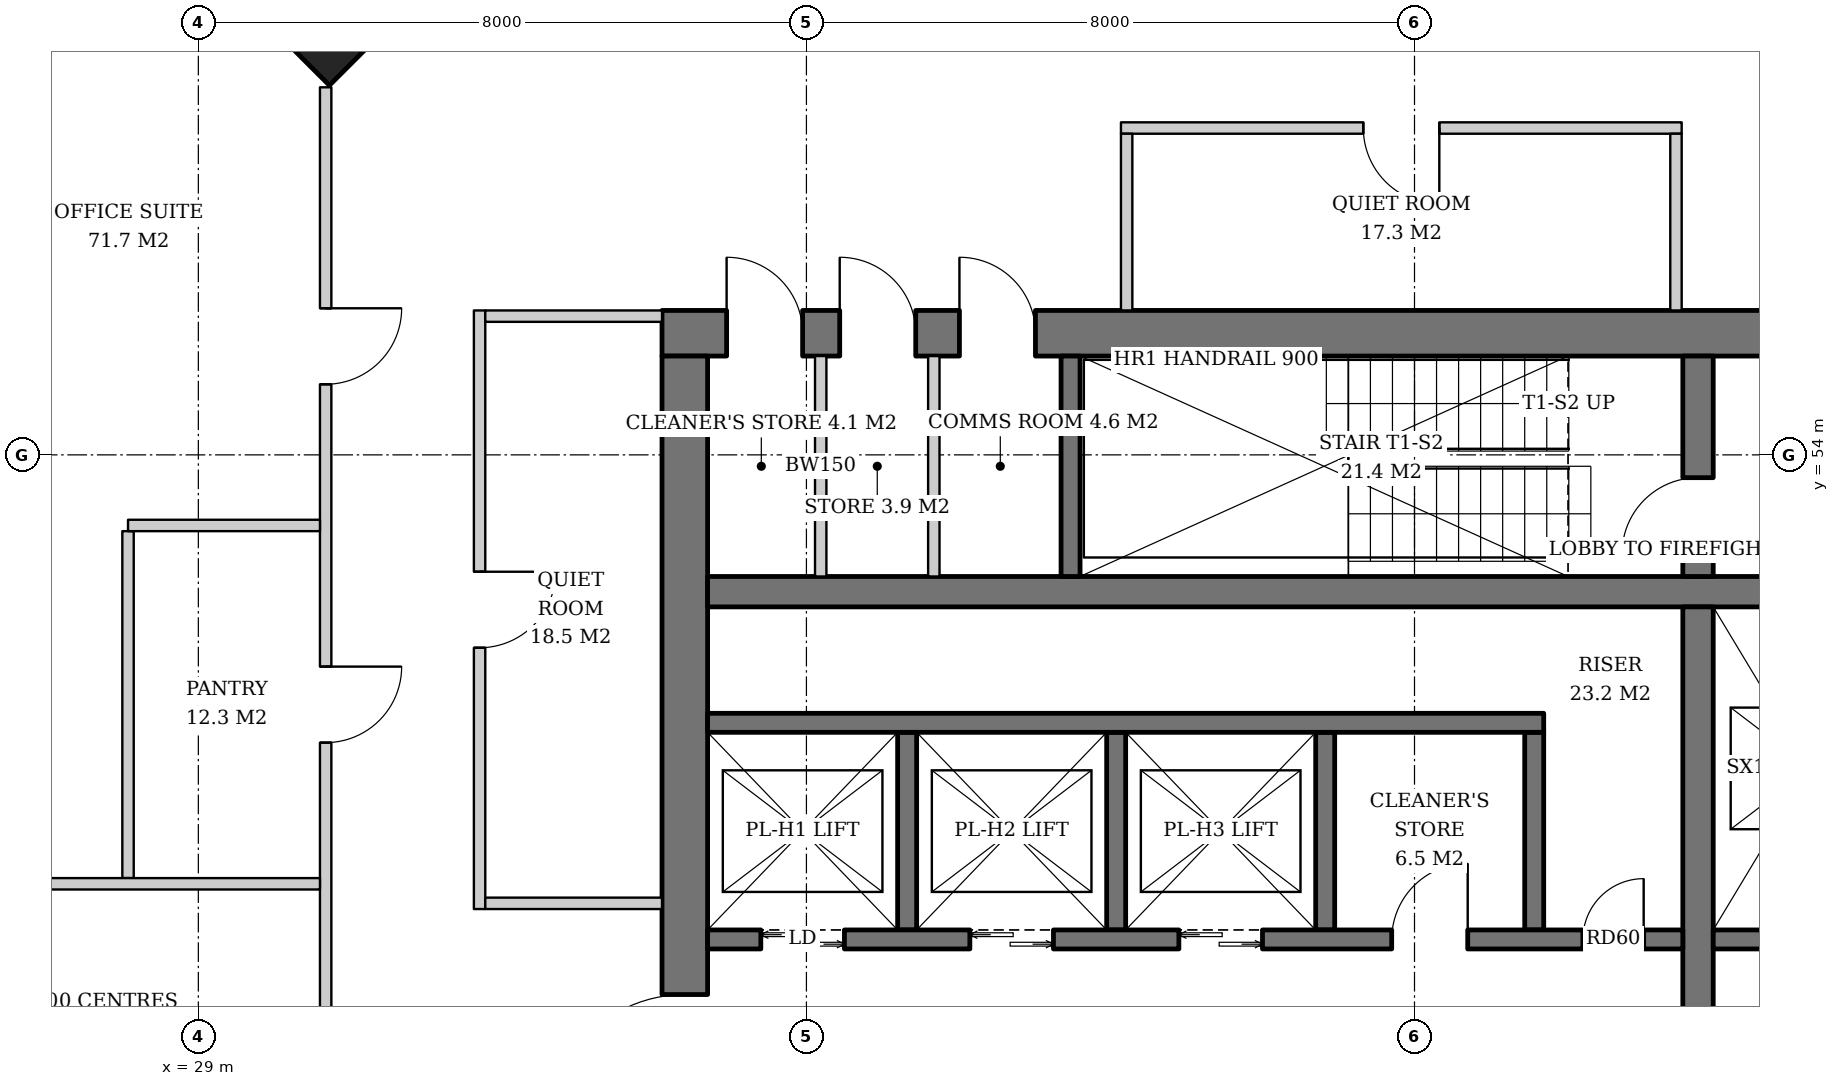
"""IFC4 building model, lengths in metres.
Left out: names, types, materials, properties, quantities, classifications, styles, units other than length and angle.
Written with IfcOpenShell. Run it as: python <this file> out.ifc"""

import sys

from ifc_helpers import new_model, si_unit, direction, frame, frame_2d, origin, origin_2d, place, context, subcontext, project, spatial, rectangle, extrude, element, fill, save


model = new_model("IFC4")
c1 = context("Model", 3, precision=1e-05, world=origin(), true_north=direction((0.0, 1.0)))
c2 = subcontext(c1, "Body", "Model", "MODEL_VIEW")
j1 = project(units=[si_unit("LENGTHUNIT", "METRE"), si_unit("PLANEANGLEUNIT", "RADIAN")], contexts=[c1])
p1 = place(None, origin())
s1 = spatial("IfcSite", under=j1, at=p1, CompositionType="ELEMENT")
p2 = place(p1, origin())
s2 = spatial("IfcBuilding", under=s1, at=p2, CompositionType="ELEMENT")
p3 = place(p2, frame((0.0, 0.0, 195.8)))
s3 = spatial("IfcBuildingStorey", under=s2, at=p3, CompositionType="ELEMENT", Elevation=195.8)
p4 = place(p3, frame((30.686, 60.314, 0.0), z_axis=(0.031898107953, -0.031898107953, 0.998981992539), x_axis=(0.707106781187, 0.707106781187, 0.0)))
e1 = element("IfcColumn", 1, at=p4, inside=s3, PredefinedType="COLUMN", context=c2, shape_type="SweptSolid", body=[
    extrude(rectangle(XDim=2.0, YDim=2.0, at=origin_2d()), origin(), (0.0, 0.0, 1.0), 3.804),
])
p5 = place(p3, frame((35.1, 55.6, 0.0), z_axis=(0.0, 0.0, 1.0), x_axis=(1.0, 0.0, 0.0)))
e2 = element("IfcWall", 2, at=p5, inside=s3, PredefinedType="SHEAR", context=c2, shape_type="SweptSolid", body=[
    extrude(rectangle(XDim=19.8, YDim=0.6, at=frame_2d((9.9, 0.0))), origin(), (0.0, 0.0, 1.0), 3.8),
])
p6 = place(p5, frame((14.54, 0.0, 0.0)))
e3 = element("IfcOpeningElement", 3, at=p6, cuts=e2, PredefinedType="OPENING", context=c2, shape_type="SweptSolid", body=[
    extrude(rectangle(XDim=1.0, YDim=2.1, at=frame_2d((0.5, 1.05))), frame((0.0, 0.31, 0.0), z_axis=(0.0, -1.0, 0.0), x_axis=(1.0, 0.0, 0.0)), (0.0, 0.0, 1.0), 0.62),
])
p7 = place(p5, frame((0.85, 0.0, 0.0)))
e4 = element("IfcOpeningElement", 4, at=p7, cuts=e2, PredefinedType="OPENING", context=c2, shape_type="SweptSolid", body=[
    extrude(rectangle(XDim=1.0, YDim=2.1, at=frame_2d((0.5, 1.05))), frame((0.0, 0.31, 0.0), z_axis=(0.0, -1.0, 0.0), x_axis=(1.0, 0.0, 0.0)), (0.0, 0.0, 1.0), 0.62),
])
p8 = place(p5, frame((2.338, 0.0, 0.0)))
e5 = element("IfcOpeningElement", 5, at=p8, cuts=e2, PredefinedType="OPENING", context=c2, shape_type="SweptSolid", body=[
    extrude(rectangle(XDim=1.0, YDim=2.1, at=frame_2d((0.5, 1.05))), frame((0.0, 0.31, 0.0), z_axis=(0.0, -1.0, 0.0), x_axis=(1.0, 0.0, 0.0)), (0.0, 0.0, 1.0), 0.62),
])
p9 = place(p5, frame((3.913, 0.0, 0.0)))
e6 = element("IfcOpeningElement", 6, at=p9, cuts=e2, PredefinedType="OPENING", context=c2, shape_type="SweptSolid", body=[
    extrude(rectangle(XDim=1.0, YDim=2.1, at=frame_2d((0.5, 1.05))), frame((0.0, 0.31, 0.0), z_axis=(0.0, -1.0, 0.0), x_axis=(1.0, 0.0, 0.0)), (0.0, 0.0, 1.0), 0.62),
])
p10 = place(p3, frame((35.4, 36.7, 0.0), z_axis=(0.0, 0.0, 1.0), x_axis=(0.0, 1.0, 0.0)))
e7 = element("IfcWall", 7, at=p10, inside=s3, PredefinedType="SHEAR", context=c2, shape_type="SweptSolid", body=[
    extrude(rectangle(XDim=18.6, YDim=0.6, at=frame_2d((9.3, 0.0))), origin(), (0.0, 0.0, 1.0), 3.8),
])
p11 = place(p10, frame((8.4, 0.0, 0.0)))
e8 = element("IfcOpeningElement", 8, at=p11, cuts=e7, PredefinedType="OPENING", context=c2, shape_type="SweptSolid", body=[
    extrude(rectangle(XDim=1.8, YDim=2.4, at=frame_2d((0.9, 1.2))), frame((0.0, 0.31, 0.0), z_axis=(0.0, -1.0, 0.0), x_axis=(1.0, 0.0, 0.0)), (0.0, 0.0, 1.0), 0.62),
])
p12 = place(p3, frame((35.7, 52.2, 0.0), z_axis=(0.0, 0.0, 1.0), x_axis=(1.0, 0.0, 0.0)))
e9 = element("IfcWall", 9, at=p12, inside=s3, PredefinedType="SHEAR", context=c2, shape_type="SweptSolid", body=[
    extrude(rectangle(XDim=18.6, YDim=0.4, at=frame_2d((9.3, 0.0))), origin(), (0.0, 0.0, 1.0), 3.8),
])
p13 = place(p3, frame((48.73, 40.0, 0.0), z_axis=(0.0, 0.0, 1.0), x_axis=(0.0, 1.0, 0.0)))
e10 = element("IfcWall", 10, at=p13, inside=s3, PredefinedType="SHEAR", context=c2, shape_type="SweptSolid", body=[
    extrude(rectangle(XDim=12.0, YDim=0.4, at=frame_2d((6.0, 0.0))), origin(), (0.0, 0.0, 1.0), 3.8),
])
p14 = place(p3, frame((48.73, 52.4, 0.0), z_axis=(0.0, 0.0, 1.0), x_axis=(0.0, 1.0, 0.0)))
e11 = element("IfcWall", 11, at=p14, inside=s3, PredefinedType="SHEAR", context=c2, shape_type="SweptSolid", body=[
    extrude(rectangle(XDim=2.9, YDim=0.4, at=frame_2d((1.45, 0.0))), origin(), (0.0, 0.0, 1.0), 3.8),
])
p15 = place(p14, frame((0.3, 0.0, 0.0)))
e12 = element("IfcOpeningElement", 12, at=p15, cuts=e11, PredefinedType="OPENING", context=c2, shape_type="SweptSolid", body=[
    extrude(rectangle(XDim=1.0, YDim=2.1, at=frame_2d((0.5, 1.05))), frame((0.0, 0.21, 0.0), z_axis=(0.0, -1.0, 0.0), x_axis=(1.0, 0.0, 0.0)), (0.0, 0.0, 1.0), 0.42),
])
p16 = place(p3, frame((40.475, 52.4, 0.0), z_axis=(0.0, 0.0, 1.0), x_axis=(0.0, 1.0, 0.0)))
e13 = element("IfcWall", 13, at=p16, inside=s3, PredefinedType="SHEAR", context=c2, shape_type="SweptSolid", body=[
    extrude(rectangle(XDim=2.9, YDim=0.25, at=frame_2d((1.45, 0.0))), origin(), (0.0, 0.0, 1.0), 3.8),
])
for number, where, z_axis, x_axis in (
    (14, (38.325, 47.75, 0.0), (0.0, 0.0, 1.0), (0.0, 1.0, 0.0)),
    (15, (41.075, 47.75, 0.0), (0.0, 0.0, 1.0), (0.0, 1.0, 0.0)),
    (16, (43.825, 47.75, 0.0), (0.0, 0.0, 1.0), (0.0, 1.0, 0.0)),
    (17, (46.575, 47.75, 0.0), (0.0, 0.0, 1.0), (0.0, 1.0, 0.0)),
):
    element("IfcWall", number, at=place(p3, frame(where, z_axis=z_axis, x_axis=x_axis)), inside=s3, PredefinedType="SHEAR", context=c2, shape_type="SweptSolid", body=[
        extrude(rectangle(XDim=2.6, YDim=0.25, at=frame_2d((1.3, 0.0))), origin(), (0.0, 0.0, 1.0), 3.8),
    ])
p17 = place(p3, frame((35.7, 50.475, 0.0), z_axis=(0.0, 0.0, 1.0), x_axis=(1.0, 0.0, 0.0)))
e18 = element("IfcWall", 18, at=p17, inside=s3, PredefinedType="SHEAR", context=c2, shape_type="SweptSolid", body=[
    extrude(rectangle(XDim=11.0, YDim=0.25, at=frame_2d((5.5, 0.0))), origin(), (0.0, 0.0, 1.0), 3.8),
])
p18 = place(p3, frame((35.7, 47.625, 0.0), z_axis=(0.0, 0.0, 1.0), x_axis=(1.0, 0.0, 0.0)))
e19 = element("IfcWall", 19, at=p18, inside=s3, PredefinedType="SHEAR", context=c2, shape_type="SweptSolid", body=[
    extrude(rectangle(XDim=12.83, YDim=0.25, at=frame_2d((6.415, 0.0))), origin(), (0.0, 0.0, 1.0), 3.8),
])
p19 = place(p18, frame((0.7, 0.0, 0.0)))
e20 = element("IfcOpeningElement", 20, at=p19, cuts=e19, PredefinedType="OPENING", context=c2, shape_type="SweptSolid", body=[
    extrude(rectangle(XDim=1.1, YDim=2.2, at=frame_2d((0.55, 1.1))), frame((0.0, 0.135, 0.0), z_axis=(0.0, -1.0, 0.0), x_axis=(1.0, 0.0, 0.0)), (0.0, 0.0, 1.0), 0.27),
])
p20 = place(p18, frame((3.45, 0.0, 0.0)))
e21 = element("IfcOpeningElement", 21, at=p20, cuts=e19, PredefinedType="OPENING", context=c2, shape_type="SweptSolid", body=[
    extrude(rectangle(XDim=1.1, YDim=2.2, at=frame_2d((0.55, 1.1))), frame((0.0, 0.135, 0.0), z_axis=(0.0, -1.0, 0.0), x_axis=(1.0, 0.0, 0.0)), (0.0, 0.0, 1.0), 0.27),
])
p21 = place(p18, frame((6.2, 0.0, 0.0)))
e22 = element("IfcOpeningElement", 22, at=p21, cuts=e19, PredefinedType="OPENING", context=c2, shape_type="SweptSolid", body=[
    extrude(rectangle(XDim=1.1, YDim=2.2, at=frame_2d((0.55, 1.1))), frame((0.0, 0.135, 0.0), z_axis=(0.0, -1.0, 0.0), x_axis=(1.0, 0.0, 0.0)), (0.0, 0.0, 1.0), 0.27),
])
p22 = place(p18, frame((9.0, 0.0, 0.0)))
e23 = element("IfcOpeningElement", 23, at=p22, cuts=e19, PredefinedType="OPENING", context=c2, shape_type="SweptSolid", body=[
    extrude(rectangle(XDim=1.0, YDim=2.1, at=frame_2d((0.5, 1.05))), frame((0.0, 0.135, 0.0), z_axis=(0.0, -1.0, 0.0), x_axis=(1.0, 0.0, 0.0)), (0.0, 0.0, 1.0), 0.27),
])
p23 = place(p18, frame((11.515, 0.0, 0.0)))
e24 = element("IfcOpeningElement", 24, at=p23, cuts=e19, PredefinedType="OPENING", context=c2, shape_type="SweptSolid", body=[
    extrude(rectangle(XDim=0.8, YDim=2.0, at=frame_2d((0.4, 1.0))), frame((0.0, 0.135, 0.0), z_axis=(0.0, -1.0, 0.0), x_axis=(1.0, 0.0, 0.0)), (0.0, 0.0, 1.0), 0.27),
])
p24 = place(p3, frame((48.93, 47.625, 0.0), z_axis=(0.0, 0.0, 1.0), x_axis=(1.0, 0.0, 0.0)))
e25 = element("IfcWall", 25, at=p24, inside=s3, PredefinedType="SHEAR", context=c2, shape_type="SweptSolid", body=[
    extrude(rectangle(XDim=5.37, YDim=0.25, at=frame_2d((2.685, 0.0))), origin(), (0.0, 0.0, 1.0), 3.8),
])
for number, where, z_axis, x_axis in (
    (26, (37.188, 52.4, 0.0), (0.0, 0.0, 1.0), (0.0, 1.0, 0.0)),
    (27, (38.676, 52.4, 0.0), (0.0, 0.0, 1.0), (0.0, 1.0, 0.0)),
):
    element("IfcWall", number, at=place(p3, frame(where, z_axis=z_axis, x_axis=x_axis)), inside=s3, PredefinedType="SOLIDWALL", context=c2, shape_type="SweptSolid", body=[
        extrude(rectangle(XDim=2.9, YDim=0.15, at=frame_2d((1.45, 0.0))), origin(), (0.0, 0.0, 1.0), 3.62),
    ])
p25 = place(p3, frame((48.515, 58.3, 0.0), z_axis=(0.0, 0.0, 1.0), x_axis=(-1.0, 0.0, 0.0)))
e28 = element("IfcWall", 28, at=p25, inside=s3, PredefinedType="PARTITIONING", context=c2, shape_type="SweptSolid", body=[
    extrude(rectangle(XDim=7.377, YDim=0.15, at=frame_2d((3.688, 0.0))), origin(), (0.0, 0.0, 1.0), 2.867),
])
p26 = place(p25, frame((3.188, 0.0, 0.0)))
e29 = element("IfcOpeningElement", 29, at=p26, cuts=e28, PredefinedType="OPENING", context=c2, shape_type="SweptSolid", body=[
    extrude(rectangle(XDim=1.0, YDim=2.1, at=frame_2d((0.5, 1.05))), frame((0.0, 0.085, 0.0), z_axis=(0.0, -1.0, 0.0), x_axis=(1.0, 0.0, 0.0)), (0.0, 0.0, 1.0), 0.17),
])
for number, where, z_axis, x_axis in (
    (30, (48.44, 55.9, 0.0), (0.0, 0.0, 1.0), (0.0, 1.0, 0.0)),
    (31, (41.213, 55.9, 0.0), (0.0, 0.0, 1.0), (0.0, 1.0, 0.0)),
):
    element("IfcWall", number, at=place(p3, frame(where, z_axis=z_axis, x_axis=x_axis)), inside=s3, PredefinedType="PARTITIONING", context=c2, shape_type="SweptSolid", body=[
        extrude(rectangle(XDim=2.325, YDim=0.15, at=frame_2d((1.163, 0.0))), origin(), (0.0, 0.0, 1.0), 3.62),
    ])
p27 = place(p3, frame((32.7, 55.9, 0.0), z_axis=(0.0, 0.0, 1.0), x_axis=(0.0, -1.0, 0.0)))
e32 = element("IfcWall", 32, at=p27, inside=s3, PredefinedType="PARTITIONING", context=c2, shape_type="SweptSolid", body=[
    extrude(rectangle(XDim=7.875, YDim=0.15, at=frame_2d((3.938, 0.0))), origin(), (0.0, 0.0, 1.0), 2.867),
])
p28 = place(p27, frame((3.438, 0.0, 0.0)))
e33 = element("IfcOpeningElement", 33, at=p28, cuts=e32, PredefinedType="OPENING", context=c2, shape_type="SweptSolid", body=[
    extrude(rectangle(XDim=1.0, YDim=2.1, at=frame_2d((0.5, 1.05))), frame((0.0, 0.085, 0.0), z_axis=(0.0, -1.0, 0.0), x_axis=(1.0, 0.0, 0.0)), (0.0, 0.0, 1.0), 0.17),
])
p29 = place(p3, frame((35.1, 55.825, 0.0), z_axis=(0.0, 0.0, 1.0), x_axis=(-1.0, 0.0, 0.0)))
e34 = element("IfcWall", 34, at=p29, inside=s3, PredefinedType="PARTITIONING", context=c2, shape_type="SweptSolid", body=[
    extrude(rectangle(XDim=2.325, YDim=0.15, at=frame_2d((1.163, 0.0))), origin(), (0.0, 0.0, 1.0), 2.867),
])
p30 = place(p3, frame((35.1, 48.1, 0.0), z_axis=(0.0, 0.0, 1.0), x_axis=(-1.0, 0.0, 0.0)))
e35 = element("IfcWall", 35, at=p30, inside=s3, PredefinedType="PARTITIONING", context=c2, shape_type="SweptSolid", body=[
    extrude(rectangle(XDim=2.325, YDim=0.15, at=frame_2d((1.163, 0.0))), origin(), (0.0, 0.0, 1.0), 3.62),
])
p31 = place(p3, frame((28.075, 52.996, 0.0), z_axis=(0.0, 0.0, 1.0), x_axis=(0.0, -1.0, 0.0)))
e36 = element("IfcWall", 36, at=p31, inside=s3, PredefinedType="PARTITIONING", context=c2, shape_type="SweptSolid", body=[
    extrude(rectangle(XDim=4.564, YDim=0.15, at=frame_2d((2.282, 0.0))), origin(), (0.0, 0.0, 1.0), 2.867),
])
p32 = place(p3, frame((30.675, 58.836, 0.0), z_axis=(0.0, 0.0, 1.0), x_axis=(0.0, -1.0, 0.0)))
e37 = element("IfcWall", 37, at=p32, inside=s3, PredefinedType="PARTITIONING", context=c2, shape_type="SweptSolid", body=[
    extrude(rectangle(XDim=25.671, YDim=0.15, at=frame_2d((12.836, 0.0))), origin(), (0.0, 0.0, 1.0), 2.867),
])
p33 = place(p32, frame((2.907, 0.0, 0.0)))
e38 = element("IfcOpeningElement", 38, at=p33, cuts=e37, PredefinedType="OPENING", context=c2, shape_type="SweptSolid", body=[
    extrude(rectangle(XDim=1.0, YDim=2.1, at=frame_2d((0.5, 1.05))), frame((0.0, 0.085, 0.0), z_axis=(0.0, -1.0, 0.0), x_axis=(1.0, 0.0, 0.0)), (0.0, 0.0, 1.0), 0.17),
])
p34 = place(p32, frame((7.622, 0.0, 0.0)))
e39 = element("IfcOpeningElement", 39, at=p34, cuts=e37, PredefinedType="OPENING", context=c2, shape_type="SweptSolid", body=[
    extrude(rectangle(XDim=1.0, YDim=2.1, at=frame_2d((0.5, 1.05))), frame((0.0, 0.085, 0.0), z_axis=(0.0, -1.0, 0.0), x_axis=(1.0, 0.0, 0.0)), (0.0, 0.0, 1.0), 0.17),
])
p35 = place(p32, frame((12.436, 0.0, 0.0)))
e40 = element("IfcOpeningElement", 40, at=p35, cuts=e37, PredefinedType="OPENING", context=c2, shape_type="SweptSolid", body=[
    extrude(rectangle(XDim=0.8, YDim=2.1, at=frame_2d((0.4, 1.05))), frame((0.0, 0.085, 0.0), z_axis=(0.0, -1.0, 0.0), x_axis=(1.0, 0.0, 0.0)), (0.0, 0.0, 1.0), 0.17),
])
p36 = place(p32, frame((17.05, 0.0, 0.0)))
e41 = element("IfcOpeningElement", 41, at=p36, cuts=e37, PredefinedType="OPENING", context=c2, shape_type="SweptSolid", body=[
    extrude(rectangle(XDim=1.0, YDim=2.1, at=frame_2d((0.5, 1.05))), frame((0.0, 0.085, 0.0), z_axis=(0.0, -1.0, 0.0), x_axis=(1.0, 0.0, 0.0)), (0.0, 0.0, 1.0), 0.17),
])
p37 = place(p32, frame((21.864, 0.0, 0.0)))
e42 = element("IfcOpeningElement", 42, at=p37, cuts=e37, PredefinedType="OPENING", context=c2, shape_type="SweptSolid", body=[
    extrude(rectangle(XDim=0.8, YDim=2.1, at=frame_2d((0.4, 1.05))), frame((0.0, 0.085, 0.0), z_axis=(0.0, -1.0, 0.0), x_axis=(1.0, 0.0, 0.0)), (0.0, 0.0, 1.0), 0.17),
])
p38 = place(p3, frame((30.6, 53.072, 0.0), z_axis=(0.0, 0.0, 1.0), x_axis=(-1.0, 0.0, 0.0)))
e43 = element("IfcWall", 43, at=p38, inside=s3, PredefinedType="PARTITIONING", context=c2, shape_type="SweptSolid", body=[
    extrude(rectangle(XDim=2.525, YDim=0.15, at=frame_2d((1.263, 0.0))), origin(), (0.0, 0.0, 1.0), 3.62),
])
p39 = place(p3, frame((30.6, 48.357, 0.0), z_axis=(0.0, 0.0, 1.0), x_axis=(-1.0, 0.0, 0.0)))
e44 = element("IfcWall", 44, at=p39, inside=s3, PredefinedType="PARTITIONING", context=c2, shape_type="SweptSolid", body=[
    extrude(rectangle(XDim=5.14, YDim=0.15, at=frame_2d((2.57, 0.0))), origin(), (0.0, 0.0, 1.0), 3.12),
])
p40 = place(p19, origin())
e45 = element("IfcDoor", 45, at=p40, inside=s3, OperationType="DOUBLE_DOOR_SLIDING", PredefinedType="DOOR", context=c2, shape_type="SweptSolid", body=[
    extrude(rectangle(XDim=1.1, YDim=2.2, at=frame_2d((0.55, 1.1))), frame((0.0, 0.025, 0.0), z_axis=(0.0, -1.0, 0.0), x_axis=(1.0, 0.0, 0.0)), (0.0, 0.0, 1.0), 0.05),
])
fill(e20, e45)
p41 = place(p20, origin())
e46 = element("IfcDoor", 46, at=p41, inside=s3, OperationType="DOUBLE_DOOR_SLIDING", PredefinedType="DOOR", context=c2, shape_type="SweptSolid", body=[
    extrude(rectangle(XDim=1.1, YDim=2.2, at=frame_2d((0.55, 1.1))), frame((0.0, 0.025, 0.0), z_axis=(0.0, -1.0, 0.0), x_axis=(1.0, 0.0, 0.0)), (0.0, 0.0, 1.0), 0.05),
])
fill(e21, e46)
p42 = place(p21, origin())
e47 = element("IfcDoor", 47, at=p42, inside=s3, OperationType="DOUBLE_DOOR_SLIDING", PredefinedType="DOOR", context=c2, shape_type="SweptSolid", body=[
    extrude(rectangle(XDim=1.1, YDim=2.2, at=frame_2d((0.55, 1.1))), frame((0.0, 0.025, 0.0), z_axis=(0.0, -1.0, 0.0), x_axis=(1.0, 0.0, 0.0)), (0.0, 0.0, 1.0), 0.05),
])
fill(e22, e47)
p43 = place(p22, origin())
e48 = element("IfcDoor", 48, at=p43, inside=s3, OperationType="SINGLE_SWING_RIGHT", PredefinedType="DOOR", context=c2, shape_type="SweptSolid", body=[
    extrude(rectangle(XDim=1.0, YDim=2.1, at=frame_2d((0.5, 1.05))), frame((0.0, 0.025, 0.0), z_axis=(0.0, -1.0, 0.0), x_axis=(1.0, 0.0, 0.0)), (0.0, 0.0, 1.0), 0.05),
])
fill(e23, e48)
p44 = place(p23, origin())
e49 = element("IfcDoor", 49, at=p44, inside=s3, OperationType="SINGLE_SWING_RIGHT", PredefinedType="DOOR", context=c2, shape_type="SweptSolid", body=[
    extrude(rectangle(XDim=0.8, YDim=2.0, at=frame_2d((0.4, 1.0))), frame((0.0, 0.025, 0.0), z_axis=(0.0, -1.0, 0.0), x_axis=(1.0, 0.0, 0.0)), (0.0, 0.0, 1.0), 0.05),
])
fill(e24, e49)
p45 = place(p15, origin())
e50 = element("IfcDoor", 50, at=p45, inside=s3, OperationType="SINGLE_SWING_LEFT", PredefinedType="DOOR", context=c2, shape_type="SweptSolid", body=[
    extrude(rectangle(XDim=1.0, YDim=2.1, at=frame_2d((0.5, 1.05))), frame((0.0, 0.025, 0.0), z_axis=(0.0, -1.0, 0.0), x_axis=(1.0, 0.0, 0.0)), (0.0, 0.0, 1.0), 0.05),
])
fill(e12, e50)
p46 = place(p11, origin())
e51 = element("IfcDoor", 51, at=p46, inside=s3, OperationType="DOUBLE_DOOR_SINGLE_SWING", PredefinedType="DOOR", context=c2, shape_type="SweptSolid", body=[
    extrude(rectangle(XDim=1.8, YDim=2.4, at=frame_2d((0.9, 1.2))), frame((0.0, 0.025, 0.0), z_axis=(0.0, -1.0, 0.0), x_axis=(1.0, 0.0, 0.0)), (0.0, 0.0, 1.0), 0.05),
])
fill(e8, e51)
p47 = place(p7, origin())
e52 = element("IfcDoor", 52, at=p47, inside=s3, OperationType="SINGLE_SWING_LEFT", PredefinedType="DOOR", context=c2, shape_type="SweptSolid", body=[
    extrude(rectangle(XDim=1.0, YDim=2.1, at=frame_2d((0.5, 1.05))), frame((0.0, -0.24, 0.0), z_axis=(0.0, -1.0, 0.0), x_axis=(1.0, 0.0, 0.0)), (0.0, 0.0, 1.0), 0.05),
])
fill(e4, e52)
p48 = place(p8, origin())
e53 = element("IfcDoor", 53, at=p48, inside=s3, OperationType="SINGLE_SWING_LEFT", PredefinedType="DOOR", context=c2, shape_type="SweptSolid", body=[
    extrude(rectangle(XDim=1.0, YDim=2.1, at=frame_2d((0.5, 1.05))), frame((0.0, -0.24, 0.0), z_axis=(0.0, -1.0, 0.0), x_axis=(1.0, 0.0, 0.0)), (0.0, 0.0, 1.0), 0.05),
])
fill(e5, e53)
p49 = place(p9, origin())
e54 = element("IfcDoor", 54, at=p49, inside=s3, OperationType="SINGLE_SWING_LEFT", PredefinedType="DOOR", context=c2, shape_type="SweptSolid", body=[
    extrude(rectangle(XDim=1.0, YDim=2.1, at=frame_2d((0.5, 1.05))), frame((0.0, -0.24, 0.0), z_axis=(0.0, -1.0, 0.0), x_axis=(1.0, 0.0, 0.0)), (0.0, 0.0, 1.0), 0.05),
])
fill(e6, e54)
p50 = place(p26, origin())
e55 = element("IfcDoor", 55, at=p50, inside=s3, OperationType="SINGLE_SWING_LEFT", PredefinedType="DOOR", context=c2, shape_type="SweptSolid", body=[
    extrude(rectangle(XDim=1.0, YDim=2.1, at=frame_2d((0.5, 1.05))), frame((0.0, 0.025, 0.0), z_axis=(0.0, -1.0, 0.0), x_axis=(1.0, 0.0, 0.0)), (0.0, 0.0, 1.0), 0.05),
])
fill(e29, e55)
p51 = place(p28, origin())
e56 = element("IfcDoor", 56, at=p51, inside=s3, OperationType="SINGLE_SWING_LEFT", PredefinedType="DOOR", context=c2, shape_type="SweptSolid", body=[
    extrude(rectangle(XDim=1.0, YDim=2.1, at=frame_2d((0.5, 1.05))), frame((0.0, 0.025, 0.0), z_axis=(0.0, -1.0, 0.0), x_axis=(1.0, 0.0, 0.0)), (0.0, 0.0, 1.0), 0.05),
])
fill(e33, e56)
p52 = place(p33, origin())
e57 = element("IfcDoor", 57, at=p52, inside=s3, OperationType="SINGLE_SWING_LEFT", PredefinedType="DOOR", context=c2, shape_type="SweptSolid", body=[
    extrude(rectangle(XDim=1.0, YDim=2.1, at=frame_2d((0.5, 1.05))), frame((0.0, 0.025, 0.0), z_axis=(0.0, -1.0, 0.0), x_axis=(1.0, 0.0, 0.0)), (0.0, 0.0, 1.0), 0.05),
])
fill(e38, e57)
p53 = place(p34, origin())
e58 = element("IfcDoor", 58, at=p53, inside=s3, OperationType="SINGLE_SWING_LEFT", PredefinedType="DOOR", context=c2, shape_type="SweptSolid", body=[
    extrude(rectangle(XDim=1.0, YDim=2.1, at=frame_2d((0.5, 1.05))), frame((0.0, 0.025, 0.0), z_axis=(0.0, -1.0, 0.0), x_axis=(1.0, 0.0, 0.0)), (0.0, 0.0, 1.0), 0.05),
])
fill(e39, e58)
save(model, sys.argv[1])
